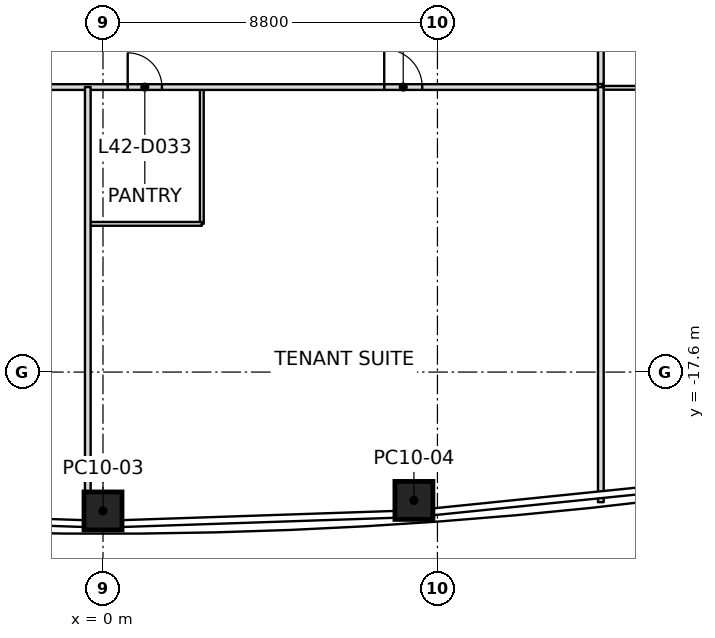
"""IFC4 building model, lengths in metres.
Left out: names, types, materials, properties, quantities, classifications, styles, units other than length and angle.
Written with IfcOpenShell. Run it as: python <this file> out.ifc"""

import sys

from ifc_helpers import new_model, si_unit, direction, frame, frame_2d, origin, origin_2d, place, context, subcontext, project, spatial, rectangle, extrude, element, fill, save


model = new_model("IFC4")
c1 = context("Model", 3, precision=1e-05, world=origin(), true_north=direction((0.0, 1.0)))
c2 = subcontext(c1, "Body", "Model", "MODEL_VIEW")
j1 = project(units=[si_unit("LENGTHUNIT", "METRE"), si_unit("PLANEANGLEUNIT", "RADIAN")], contexts=[c1])
p1 = place(None, origin())
s1 = spatial("IfcSite", under=j1, at=p1, CompositionType="ELEMENT")
p2 = place(p1, origin())
s2 = spatial("IfcBuilding", under=s1, at=p2, CompositionType="ELEMENT")
p3 = place(p2, frame((0.0, 0.0, 189.8)))
s3 = spatial("IfcBuildingStorey", under=s2, at=p3, CompositionType="ELEMENT", Elevation=189.8)
p4 = place(p3, frame((0.0, -21.254, 0.0), z_axis=(0.0, 0.011473854038, 0.99993417317), x_axis=(1.0, 0.0, 0.0)))
e1 = element("IfcColumn", 1, at=p4, inside=s3, PredefinedType="COLUMN", context=c2, shape_type="SweptSolid", body=[
    extrude(rectangle(XDim=1.0, YDim=1.0, at=origin_2d()), origin(), (0.0, 0.0, 1.0), 4.0),
])
p5 = place(p3, frame((8.181, -20.977, 0.0), z_axis=(-0.008788174922, 0.01116830563, 0.999899013366), x_axis=(0.997670848566, 0.067739841795, 0.008011975778)))
e2 = element("IfcColumn", 2, at=p5, inside=s3, PredefinedType="COLUMN", context=c2, shape_type="SweptSolid", body=[
    extrude(rectangle(XDim=1.0, YDim=1.0, at=origin_2d()), origin(), (0.0, 0.0, 1.0), 4.0),
])
p6 = place(p3, frame((-0.4, -10.1, 0.0), z_axis=(0.0, 0.0, 1.0), x_axis=(0.0, -1.0, 0.0)))
e3 = element("IfcWall", 3, at=p6, inside=s3, PredefinedType="PARTITIONING", context=c2, shape_type="SweptSolid", body=[
    extrude(rectangle(XDim=11.63, YDim=0.15, at=frame_2d((5.815, 0.0))), origin(), (0.0, 0.0, 1.0), 3.234),
])
p7 = place(p3, frame((13.1, -10.1, 0.0), z_axis=(0.0, 0.0, 1.0), x_axis=(0.0, -1.0, 0.0)))
e4 = element("IfcWall", 4, at=p7, inside=s3, PredefinedType="PARTITIONING", context=c2, shape_type="SweptSolid", body=[
    extrude(rectangle(XDim=10.923, YDim=0.15, at=frame_2d((5.462, 0.0))), origin(), (0.0, 0.0, 1.0), 3.234),
])
p8 = place(p3, frame((-13.02, -10.1, 0.0), z_axis=(0.0, 0.0, 1.0), x_axis=(1.0, 0.0, 0.0)))
e5 = element("IfcWall", 5, at=p8, inside=s3, PredefinedType="PARTITIONING", context=c2, shape_type="SweptSolid", body=[
    extrude(rectangle(XDim=26.04, YDim=0.15, at=frame_2d((13.02, 0.0))), origin(), (0.0, 0.0, 1.0), 3.317),
])
p9 = place(p8, frame((1.26, 0.0, 0.0)))
e6 = element("IfcOpeningElement", 6, at=p9, cuts=e5, PredefinedType="OPENING", context=c2, shape_type="SweptSolid", body=[
    extrude(rectangle(XDim=1.0, YDim=2.1, at=frame_2d((0.5, 1.05))), frame((0.0, 0.075, 0.0), z_axis=(0.0, -1.0, 0.0), x_axis=(1.0, 0.0, 0.0)), (0.0, 0.0, 1.0), 0.15),
])
p10 = place(p8, frame((4.97, 0.0, 0.0)))
e7 = element("IfcOpeningElement", 7, at=p10, cuts=e5, PredefinedType="OPENING", context=c2, shape_type="SweptSolid", body=[
    extrude(rectangle(XDim=0.9, YDim=2.1, at=frame_2d((0.45, 1.05))), frame((0.0, 0.075, 0.0), z_axis=(0.0, -1.0, 0.0), x_axis=(1.0, 0.0, 0.0)), (0.0, 0.0, 1.0), 0.15),
])
p11 = place(p8, frame((9.47, 0.0, 0.0)))
e8 = element("IfcOpeningElement", 8, at=p11, cuts=e5, PredefinedType="OPENING", context=c2, shape_type="SweptSolid", body=[
    extrude(rectangle(XDim=1.0, YDim=2.1, at=frame_2d((0.5, 1.05))), frame((0.0, 0.075, 0.0), z_axis=(0.0, -1.0, 0.0), x_axis=(1.0, 0.0, 0.0)), (0.0, 0.0, 1.0), 0.15),
])
p12 = place(p8, frame((13.67, 0.0, 0.0)))
e9 = element("IfcOpeningElement", 9, at=p12, cuts=e5, PredefinedType="OPENING", context=c2, shape_type="SweptSolid", body=[
    extrude(rectangle(XDim=0.9, YDim=2.1, at=frame_2d((0.45, 1.05))), frame((0.0, 0.075, 0.0), z_axis=(0.0, -1.0, 0.0), x_axis=(1.0, 0.0, 0.0)), (0.0, 0.0, 1.0), 0.15),
])
p13 = place(p8, frame((20.42, 0.0, 0.0)))
e10 = element("IfcOpeningElement", 10, at=p13, cuts=e5, PredefinedType="OPENING", context=c2, shape_type="SweptSolid", body=[
    extrude(rectangle(XDim=1.0, YDim=2.1, at=frame_2d((0.5, 1.05))), frame((0.0, 0.075, 0.0), z_axis=(0.0, -1.0, 0.0), x_axis=(1.0, 0.0, 0.0)), (0.0, 0.0, 1.0), 0.15),
])
p14 = place(p3, frame((13.1, -10.02, 0.0), z_axis=(0.0, 0.0, 1.0), x_axis=(0.0, 1.0, 0.0)))
e11 = element("IfcWall", 11, at=p14, inside=s3, PredefinedType="PARTITIONING", context=c2, shape_type="SweptSolid", body=[
    extrude(rectangle(XDim=20.04, YDim=0.15, at=frame_2d((10.02, 0.0))), origin(), (0.0, 0.0, 1.0), 3.166),
])
p15 = place(p14, frame((15.12, 0.0, 0.0)))
e12 = element("IfcOpeningElement", 12, at=p15, cuts=e11, PredefinedType="OPENING", context=c2, shape_type="SweptSolid", body=[
    extrude(rectangle(XDim=1.0, YDim=2.1, at=frame_2d((0.5, 1.05))), frame((0.0, 0.075, 0.0), z_axis=(0.0, -1.0, 0.0), x_axis=(1.0, 0.0, 0.0)), (0.0, 0.0, 1.0), 0.15),
])
p16 = place(p14, frame((0.95, 0.0, 0.0)))
e13 = element("IfcOpeningElement", 13, at=p16, cuts=e11, PredefinedType="OPENING", context=c2, shape_type="SweptSolid", body=[
    extrude(rectangle(XDim=0.9, YDim=2.1, at=frame_2d((0.45, 1.05))), frame((0.0, 0.075, 0.0), z_axis=(0.0, -1.0, 0.0), x_axis=(1.0, 0.0, 0.0)), (0.0, 0.0, 1.0), 0.15),
])
p17 = place(p14, frame((6.56, 0.0, 0.0)))
e14 = element("IfcOpeningElement", 14, at=p17, cuts=e11, PredefinedType="OPENING", context=c2, shape_type="SweptSolid", body=[
    extrude(rectangle(XDim=1.0, YDim=2.1, at=frame_2d((0.5, 1.05))), frame((0.0, 0.075, 0.0), z_axis=(0.0, -1.0, 0.0), x_axis=(1.0, 0.0, 0.0)), (0.0, 0.0, 1.0), 0.15),
])
p18 = place(p3, frame((2.6, -10.13, 0.0), z_axis=(0.0, 0.0, 1.0), x_axis=(0.0, -1.0, 0.0)))
e15 = element("IfcWall", 15, at=p18, inside=s3, PredefinedType="PARTITIONING", context=c2, shape_type="SweptSolid", body=[
    extrude(rectangle(XDim=3.57, YDim=0.1, at=frame_2d((1.785, 0.0))), origin(), (0.0, 0.0, 1.0), 3.45),
])
p19 = place(p3, frame((2.6, -13.7, 0.0), z_axis=(0.0, 0.0, 1.0), x_axis=(-1.0, 0.0, 0.0)))
e16 = element("IfcWall", 16, at=p19, inside=s3, PredefinedType="PARTITIONING", context=c2, shape_type="SweptSolid", body=[
    extrude(rectangle(XDim=2.97, YDim=0.1, at=frame_2d((1.485, 0.0))), origin(), (0.0, 0.0, 1.0), 3.45),
])
p20 = place(p3, frame((16.7, -10.12, 0.0), z_axis=(0.0, 0.0, 1.0), x_axis=(-1.0, 0.0, 0.0)))
e17 = element("IfcWall", 17, at=p20, inside=s3, PredefinedType="PARTITIONING", context=c2, shape_type="SweptSolid", body=[
    extrude(rectangle(XDim=3.57, YDim=0.1, at=frame_2d((1.785, 0.0))), origin(), (0.0, 0.0, 1.0), 3.166),
])
p21 = place(p12, origin())
e18 = element("IfcDoor", 18, at=p21, inside=s3, OperationType="SINGLE_SWING_RIGHT", PredefinedType="DOOR", context=c2, shape_type="SweptSolid", body=[
    extrude(rectangle(XDim=0.9, YDim=2.1, at=frame_2d((0.45, 1.05))), frame((0.0, 0.025, 0.0), z_axis=(0.0, -1.0, 0.0), x_axis=(1.0, 0.0, 0.0)), (0.0, 0.0, 1.0), 0.05),
])
fill(e9, e18)
p22 = place(p13, origin())
e19 = element("IfcDoor", 19, at=p22, inside=s3, OperationType="SINGLE_SWING_LEFT", PredefinedType="DOOR", context=c2, shape_type="SweptSolid", body=[
    extrude(rectangle(XDim=1.0, YDim=2.1, at=frame_2d((0.5, 1.05))), frame((0.0, 0.025, 0.0), z_axis=(0.0, -1.0, 0.0), x_axis=(1.0, 0.0, 0.0)), (0.0, 0.0, 1.0), 0.05),
])
fill(e10, e19)
save(model, sys.argv[1])
